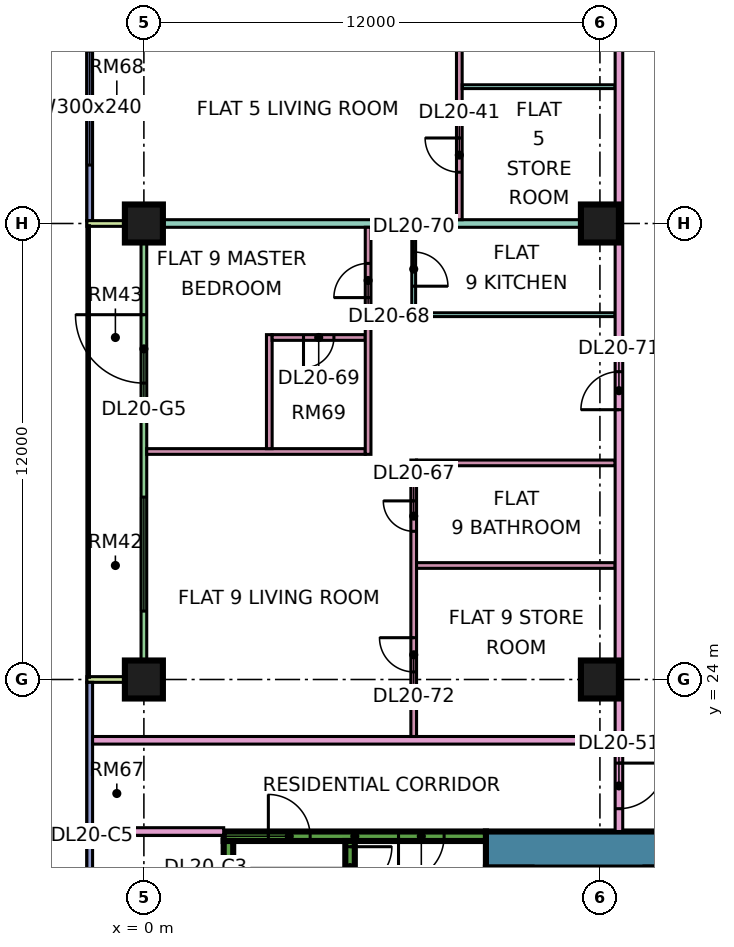
"""IFC4 building model, lengths in metres.
Left out: names, types, materials, properties, quantities, classifications, styles, units other than length and angle.
Written with IfcOpenShell. Run it as: python <this file> out.ifc"""

import sys

from ifc_helpers import new_model, si_unit, direction, frame, frame_2d, origin, origin_2d, place, context, subcontext, project, spatial, rectangle, extrude, element, fill, save


model = new_model("IFC4")
c1 = context("Model", 3, precision=1e-05, world=origin(), true_north=direction((0.0, 1.0)))
c2 = subcontext(c1, "Body", "Model", "MODEL_VIEW")
j1 = project(units=[si_unit("LENGTHUNIT", "METRE"), si_unit("PLANEANGLEUNIT", "RADIAN")], contexts=[c1])
p1 = place(None, origin())
s1 = spatial("IfcSite", under=j1, at=p1, CompositionType="ELEMENT")
p2 = place(p1, origin())
s2 = spatial("IfcBuilding", under=s1, at=p2, CompositionType="ELEMENT")
p3 = place(p2, frame((0.0, 0.0, 91.9)))
s3 = spatial("IfcBuildingStorey", under=s2, at=p3, CompositionType="ELEMENT", Elevation=91.9)
p4 = place(p3, frame((0.0, 24.0, 0.0), z_axis=(0.0, 0.0, 1.0), x_axis=(1.0, 0.0, 0.0)))
e1 = element("IfcColumn", 1, at=p4, inside=s3, PredefinedType="COLUMN", context=c2, shape_type="SweptSolid", body=[
    extrude(rectangle(XDim=1.0, YDim=1.0, at=origin_2d()), origin(), (0.0, 0.0, 1.0), 3.75),
])
p5 = place(p3, frame((0.0, 36.0, 0.0), z_axis=(0.0, 0.0, 1.0), x_axis=(1.0, 0.0, 0.0)))
e2 = element("IfcColumn", 2, at=p5, inside=s3, PredefinedType="COLUMN", context=c2, shape_type="SweptSolid", body=[
    extrude(rectangle(XDim=1.0, YDim=1.0, at=origin_2d()), origin(), (0.0, 0.0, 1.0), 3.75),
])
for number, where, z_axis, x_axis in (
    (3, (12.0, 24.0, 0.0), (0.0, 0.0, 1.0), (1.0, 0.0, 0.0)),
    (4, (12.0, 36.0, 0.0), (0.0, 0.0, 1.0), (1.0, 0.0, 0.0)),
):
    element("IfcColumn", number, at=place(p3, frame(where, z_axis=z_axis, x_axis=x_axis)), inside=s3, PredefinedType="COLUMN", context=c2, shape_type="SweptSolid", body=[
        extrude(rectangle(XDim=1.0, YDim=1.0, at=origin_2d()), origin(), (0.0, 0.0, 1.0), 3.75),
    ])
p6 = place(p3, frame((9.0, 19.525, 0.0), z_axis=(0.0, 0.0, 1.0), x_axis=(1.0, 0.0, 0.0)))
e5 = element("IfcWall", 5, at=p6, inside=s3, PredefinedType="SHEAR", context=c2, shape_type="SweptSolid", body=[
    extrude(rectangle(XDim=25.0, YDim=0.95, at=frame_2d((12.5, 0.0))), origin(), (0.0, 0.0, 1.0), 3.75),
])
p7 = place(p6, frame((19.1, 0.0, 0.0)))
e6 = element("IfcOpeningElement", 6, at=p7, cuts=e5, PredefinedType="OPENING", context=c2, shape_type="SweptSolid", body=[
    extrude(rectangle(XDim=1.8, YDim=2.4, at=frame_2d((0.9, 1.2))), frame((0.0, 0.485, 0.0), z_axis=(0.0, -1.0, 0.0), x_axis=(1.0, 0.0, 0.0)), (0.0, 0.0, 1.0), 0.97),
])
p8 = place(p3, frame((2.1, 19.875, 0.0), z_axis=(0.0, 0.0, 1.0), x_axis=(1.0, 0.0, 0.0)))
e7 = element("IfcWall", 7, at=p8, inside=s3, PredefinedType="SHEAR", context=c2, shape_type="SweptSolid", body=[
    extrude(rectangle(XDim=6.9, YDim=0.25, at=frame_2d((3.45, 0.0))), origin(), (0.0, 0.0, 1.0), 3.75),
])
p9 = place(p8, frame((1.175, 0.0, 0.0)))
e8 = element("IfcOpeningElement", 8, at=p9, cuts=e7, PredefinedType="OPENING", context=c2, shape_type="SweptSolid", body=[
    extrude(rectangle(XDim=1.1, YDim=2.2, at=frame_2d((0.55, 1.1))), frame((0.0, 0.135, 0.0), z_axis=(0.0, -1.0, 0.0), x_axis=(1.0, 0.0, 0.0)), (0.0, 0.0, 1.0), 0.27),
])
p10 = place(p8, frame((4.6, 0.0, 0.0)))
e9 = element("IfcOpeningElement", 9, at=p10, cuts=e7, PredefinedType="OPENING", context=c2, shape_type="SweptSolid", body=[
    extrude(rectangle(XDim=1.2, YDim=2.2, at=frame_2d((0.6, 1.1))), frame((0.0, 0.135, 0.0), z_axis=(0.0, -1.0, 0.0), x_axis=(1.0, 0.0, 0.0)), (0.0, 0.0, 1.0), 0.27),
])
p11 = place(p3, frame((2.225, 13.25, 0.0), z_axis=(0.0, 0.0, 1.0), x_axis=(0.0, 1.0, 0.0)))
e10 = element("IfcWall", 10, at=p11, inside=s3, PredefinedType="SHEAR", context=c2, shape_type="SweptSolid", body=[
    extrude(rectangle(XDim=6.5, YDim=0.25, at=frame_2d((3.25, 0.0))), origin(), (0.0, 0.0, 1.0), 3.75),
])
p12 = place(p3, frame((5.425, 13.25, 0.0), z_axis=(0.0, 0.0, 1.0), x_axis=(0.0, 1.0, 0.0)))
e11 = element("IfcWall", 11, at=p12, inside=s3, PredefinedType="SHEAR", context=c2, shape_type="SweptSolid", body=[
    extrude(rectangle(XDim=6.5, YDim=0.25, at=frame_2d((3.25, 0.0))), origin(), (0.0, 0.0, 1.0), 3.75),
])
p13 = place(p12, frame((5.25, 0.0, 0.0)))
e12 = element("IfcOpeningElement", 12, at=p13, cuts=e11, PredefinedType="OPENING", context=c2, shape_type="SweptSolid", body=[
    extrude(rectangle(XDim=1.1, YDim=2.2, at=frame_2d((0.55, 1.1))), frame((0.0, 0.135, 0.0), z_axis=(0.0, -1.0, 0.0), x_axis=(1.0, 0.0, 0.0)), (0.0, 0.0, 1.0), 0.27),
])
p14 = place(p3, frame((-1.425, 47.925, 0.0), z_axis=(0.0, 0.0, 1.0), x_axis=(0.0, -1.0, 0.0)))
e13 = element("IfcWall", 13, at=p14, inside=s3, PredefinedType="SOLIDWALL", context=c2, shape_type="SweptSolid", body=[
    extrude(rectangle(XDim=11.85, YDim=0.15, at=frame_2d((5.925, 0.0))), origin(), (0.0, 0.0, 1.0), 3.35),
])
p15 = place(p14, frame((1.462, 0.0, 0.45)))
e14 = element("IfcOpeningElement", 14, at=p15, cuts=e13, PredefinedType="OPENING", context=c2, shape_type="SweptSolid", body=[
    extrude(rectangle(XDim=3.0, YDim=2.4, at=frame_2d((1.5, 1.2))), frame((0.0, 0.085, 0.0), z_axis=(0.0, -1.0, 0.0), x_axis=(1.0, 0.0, 0.0)), (0.0, 0.0, 1.0), 0.17),
])
p16 = place(p14, frame((7.387, 0.0, 0.45)))
e15 = element("IfcOpeningElement", 15, at=p16, cuts=e13, PredefinedType="OPENING", context=c2, shape_type="SweptSolid", body=[
    extrude(rectangle(XDim=3.0, YDim=2.4, at=frame_2d((1.5, 1.2))), frame((0.0, 0.085, 0.0), z_axis=(0.0, -1.0, 0.0), x_axis=(1.0, 0.0, 0.0)), (0.0, 0.0, 1.0), 0.17),
])
p17 = place(p3, frame((0.0, 35.925, 0.0), z_axis=(0.0, 0.0, 1.0), x_axis=(0.0, -1.0, 0.0)))
e16 = element("IfcWall", 16, at=p17, inside=s3, PredefinedType="SOLIDWALL", context=c2, shape_type="SweptSolid", body=[
    extrude(rectangle(XDim=11.85, YDim=0.15, at=frame_2d((5.925, 0.0))), origin(), (0.0, 0.0, 1.0), 3.35),
])
p18 = place(p17, frame((2.325, 0.0, 0.0)))
e17 = element("IfcOpeningElement", 17, at=p18, cuts=e16, PredefinedType="OPENING", context=c2, shape_type="SweptSolid", body=[
    extrude(rectangle(XDim=1.8, YDim=2.4, at=frame_2d((0.9, 1.2))), frame((0.0, 0.085, 0.0), z_axis=(0.0, -1.0, 0.0), x_axis=(1.0, 0.0, 0.0)), (0.0, 0.0, 1.0), 0.17),
])
p19 = place(p17, frame((7.125, 0.0, 0.45)))
e18 = element("IfcOpeningElement", 18, at=p19, cuts=e16, PredefinedType="OPENING", context=c2, shape_type="SweptSolid", body=[
    extrude(rectangle(XDim=3.0, YDim=2.4, at=frame_2d((1.5, 1.2))), frame((0.0, 0.085, 0.0), z_axis=(0.0, -1.0, 0.0), x_axis=(1.0, 0.0, 0.0)), (0.0, 0.0, 1.0), 0.17),
])
for number, where, z_axis, x_axis in (
    (19, (-1.5, 36.0, 0.0), (0.0, 0.0, 1.0), (1.0, 0.0, 0.0)),
    (20, (-1.5, 24.0, 0.0), (0.0, 0.0, 1.0), (1.0, 0.0, 0.0)),
):
    element("IfcWall", number, at=place(p3, frame(where, z_axis=z_axis, x_axis=x_axis)), inside=s3, PredefinedType="SOLIDWALL", context=c2, shape_type="SweptSolid", body=[
        extrude(rectangle(XDim=1.5, YDim=0.15, at=frame_2d((0.75, 0.0))), origin(), (0.0, 0.0, 1.0), 3.35),
    ])
p20 = place(p3, frame((-1.425, 23.925, 0.0), z_axis=(0.0, 0.0, 1.0), x_axis=(0.0, -1.0, 0.0)))
e21 = element("IfcWall", 21, at=p20, inside=s3, PredefinedType="SOLIDWALL", context=c2, shape_type="SweptSolid", body=[
    extrude(rectangle(XDim=11.425, YDim=0.15, at=frame_2d((5.712, 0.0))), origin(), (0.0, 0.0, 1.0), 3.35),
])
p21 = place(p20, frame((6.175, 0.0, 0.45)))
e22 = element("IfcOpeningElement", 22, at=p21, cuts=e21, PredefinedType="OPENING", context=c2, shape_type="SweptSolid", body=[
    extrude(rectangle(XDim=3.0, YDim=2.4, at=frame_2d((1.5, 1.2))), frame((0.0, 0.085, 0.0), z_axis=(0.0, -1.0, 0.0), x_axis=(1.0, 0.0, 0.0)), (0.0, 0.0, 1.0), 0.17),
])
p22 = place(p3, frame((-1.35, 20.0, 0.0), z_axis=(0.0, 0.0, 1.0), x_axis=(1.0, 0.0, 0.0)))
e23 = element("IfcWall", 23, at=p22, inside=s3, PredefinedType="PARTITIONING", context=c2, shape_type="SweptSolid", body=[
    extrude(rectangle(XDim=3.45, YDim=0.2, at=frame_2d((1.725, 0.0))), origin(), (0.0, 0.0, 1.0), 3.35),
])
p23 = place(p3, frame((-1.35, 22.4, 0.0), z_axis=(0.0, 0.0, 1.0), x_axis=(1.0, 0.0, 0.0)))
e24 = element("IfcWall", 24, at=p23, inside=s3, PredefinedType="PARTITIONING", context=c2, shape_type="SweptSolid", body=[
    extrude(rectangle(XDim=13.75, YDim=0.2, at=frame_2d((6.875, 0.0))), origin(), (0.0, 0.0, 1.0), 3.35),
])
e25 = element("IfcWall", 25, at=p5, inside=s3, PredefinedType="PARTITIONING", context=c2, shape_type="SweptSolid", body=[
    extrude(rectangle(XDim=12.4, YDim=0.2, at=frame_2d((6.2, 0.0))), origin(), (0.0, 0.0, 1.0), 3.35),
])
p24 = place(p3, frame((0.074, 30.0, 0.0), z_axis=(0.0, 0.0, 1.0), x_axis=(1.0, 0.0, 0.0)))
e26 = element("IfcWall", 26, at=p24, inside=s3, PredefinedType="PARTITIONING", context=c2, shape_type="SweptSolid", body=[
    extrude(rectangle(XDim=5.751, YDim=0.15, at=frame_2d((2.875, 0.0))), origin(), (0.0, 0.0, 1.0), 3.35),
])
p25 = place(p3, frame((3.3, 30.075, 0.0), z_axis=(0.0, 0.0, 1.0), x_axis=(0.0, 1.0, 0.0)))
e27 = element("IfcWall", 27, at=p25, inside=s3, PredefinedType="PARTITIONING", context=c2, shape_type="SweptSolid", body=[
    extrude(rectangle(XDim=3.0, YDim=0.15, at=frame_2d((1.5, 0.0))), origin(), (0.0, 0.0, 1.0), 3.35),
])
p26 = place(p3, frame((3.375, 33.0, 0.0), z_axis=(0.0, 0.0, 1.0), x_axis=(1.0, 0.0, 0.0)))
e28 = element("IfcWall", 28, at=p26, inside=s3, PredefinedType="PARTITIONING", context=c2, shape_type="SweptSolid", body=[
    extrude(rectangle(XDim=2.45, YDim=0.15, at=frame_2d((1.225, 0.0))), origin(), (0.0, 0.0, 1.0), 3.35),
])
p27 = place(p26, frame((0.825, 0.0, 0.0)))
e29 = element("IfcOpeningElement", 29, at=p27, cuts=e28, PredefinedType="OPENING", context=c2, shape_type="SweptSolid", body=[
    extrude(rectangle(XDim=0.8, YDim=2.1, at=frame_2d((0.4, 1.05))), frame((0.0, 0.085, 0.0), z_axis=(0.0, -1.0, 0.0), x_axis=(1.0, 0.0, 0.0)), (0.0, 0.0, 1.0), 0.17),
])
p28 = place(p3, frame((5.9, 29.925, 0.0), z_axis=(0.0, 0.0, 1.0), x_axis=(0.0, 1.0, 0.0)))
e30 = element("IfcWall", 30, at=p28, inside=s3, PredefinedType="PARTITIONING", context=c2, shape_type="SweptSolid", body=[
    extrude(rectangle(XDim=5.975, YDim=0.15, at=frame_2d((2.987, 0.0))), origin(), (0.0, 0.0, 1.0), 3.35),
])
p29 = place(p28, frame((4.125, 0.0, 0.0)))
e31 = element("IfcOpeningElement", 31, at=p29, cuts=e30, PredefinedType="OPENING", context=c2, shape_type="SweptSolid", body=[
    extrude(rectangle(XDim=0.9, YDim=2.1, at=frame_2d((0.45, 1.05))), frame((0.0, 0.085, 0.0), z_axis=(0.0, -1.0, 0.0), x_axis=(1.0, 0.0, 0.0)), (0.0, 0.0, 1.0), 0.17),
])
p30 = place(p3, frame((7.05, 33.6, 0.0), z_axis=(0.0, 0.0, 1.0), x_axis=(1.0, 0.0, 0.0)))
e32 = element("IfcWall", 32, at=p30, inside=s3, PredefinedType="PARTITIONING", context=c2, shape_type="SweptSolid", body=[
    extrude(rectangle(XDim=5.35, YDim=0.1, at=frame_2d((2.675, 0.0))), origin(), (0.0, 0.0, 1.0), 3.35),
])
p31 = place(p3, frame((7.1, 22.5, 0.0), z_axis=(0.0, 0.0, 1.0), x_axis=(0.0, 1.0, 0.0)))
e33 = element("IfcWall", 33, at=p31, inside=s3, PredefinedType="PARTITIONING", context=c2, shape_type="SweptSolid", body=[
    extrude(rectangle(XDim=7.275, YDim=0.15, at=frame_2d((3.637, 0.0))), origin(), (0.0, 0.0, 1.0), 3.35),
])
p32 = place(p31, frame((5.4, 0.0, 0.0)))
e34 = element("IfcOpeningElement", 34, at=p32, cuts=e33, PredefinedType="OPENING", context=c2, shape_type="SweptSolid", body=[
    extrude(rectangle(XDim=0.8, YDim=2.1, at=frame_2d((0.4, 1.05))), frame((0.0, 0.085, 0.0), z_axis=(0.0, -1.0, 0.0), x_axis=(1.0, 0.0, 0.0)), (0.0, 0.0, 1.0), 0.17),
])
p33 = place(p31, frame((1.7, 0.0, 0.0)))
e35 = element("IfcOpeningElement", 35, at=p33, cuts=e33, PredefinedType="OPENING", context=c2, shape_type="SweptSolid", body=[
    extrude(rectangle(XDim=0.9, YDim=2.1, at=frame_2d((0.45, 1.05))), frame((0.0, 0.085, 0.0), z_axis=(0.0, -1.0, 0.0), x_axis=(1.0, 0.0, 0.0)), (0.0, 0.0, 1.0), 0.17),
])
p34 = place(p3, frame((7.1, 33.65, 0.0), z_axis=(0.0, 0.0, 1.0), x_axis=(0.0, 1.0, 0.0)))
e36 = element("IfcWall", 36, at=p34, inside=s3, PredefinedType="PARTITIONING", context=c2, shape_type="SweptSolid", body=[
    extrude(rectangle(XDim=2.25, YDim=0.1, at=frame_2d((1.125, 0.0))), origin(), (0.0, 0.0, 1.0), 3.35),
])
p35 = place(p34, frame((0.7, 0.0, 0.0)))
e37 = element("IfcOpeningElement", 37, at=p35, cuts=e36, PredefinedType="OPENING", context=c2, shape_type="SweptSolid", body=[
    extrude(rectangle(XDim=0.9, YDim=2.1, at=frame_2d((0.45, 1.05))), frame((0.0, 0.06, 0.0), z_axis=(0.0, -1.0, 0.0), x_axis=(1.0, 0.0, 0.0)), (0.0, 0.0, 1.0), 0.12),
])
for number, where, z_axis, x_axis in (
    (38, (7.175, 27.0, 0.0), (0.0, 0.0, 1.0), (1.0, 0.0, 0.0)),
    (39, (7.175, 29.7, 0.0), (0.0, 0.0, 1.0), (1.0, 0.0, 0.0)),
):
    element("IfcWall", number, at=place(p3, frame(where, z_axis=z_axis, x_axis=x_axis)), inside=s3, PredefinedType="PARTITIONING", context=c2, shape_type="SweptSolid", body=[
        extrude(rectangle(XDim=5.225, YDim=0.15, at=frame_2d((2.612, 0.0))), origin(), (0.0, 0.0, 1.0), 3.35),
    ])
p36 = place(p3, frame((8.3, 36.1, 0.0), z_axis=(0.0, 0.0, 1.0), x_axis=(0.0, 1.0, 0.0)))
e40 = element("IfcWall", 40, at=p36, inside=s3, PredefinedType="PARTITIONING", context=c2, shape_type="SweptSolid", body=[
    extrude(rectangle(XDim=11.375, YDim=0.15, at=frame_2d((5.688, 0.0))), origin(), (0.0, 0.0, 1.0), 3.35),
])
p37 = place(p36, frame((9.5, 0.0, 0.0)))
e41 = element("IfcOpeningElement", 41, at=p37, cuts=e40, PredefinedType="OPENING", context=c2, shape_type="SweptSolid", body=[
    extrude(rectangle(XDim=0.8, YDim=2.1, at=frame_2d((0.4, 1.05))), frame((0.0, 0.085, 0.0), z_axis=(0.0, -1.0, 0.0), x_axis=(1.0, 0.0, 0.0)), (0.0, 0.0, 1.0), 0.17),
])
p38 = place(p36, frame((5.6, 0.0, 0.0)))
e42 = element("IfcOpeningElement", 42, at=p38, cuts=e40, PredefinedType="OPENING", context=c2, shape_type="SweptSolid", body=[
    extrude(rectangle(XDim=0.9, YDim=2.1, at=frame_2d((0.45, 1.05))), frame((0.0, 0.085, 0.0), z_axis=(0.0, -1.0, 0.0), x_axis=(1.0, 0.0, 0.0)), (0.0, 0.0, 1.0), 0.17),
])
p39 = place(p36, frame((1.25, 0.0, 0.0)))
e43 = element("IfcOpeningElement", 43, at=p39, cuts=e40, PredefinedType="OPENING", context=c2, shape_type="SweptSolid", body=[
    extrude(rectangle(XDim=0.9, YDim=2.1, at=frame_2d((0.45, 1.05))), frame((0.0, 0.085, 0.0), z_axis=(0.0, -1.0, 0.0), x_axis=(1.0, 0.0, 0.0)), (0.0, 0.0, 1.0), 0.17),
])
p40 = place(p3, frame((8.375, 39.6, 0.0), z_axis=(0.0, 0.0, 1.0), x_axis=(1.0, 0.0, 0.0)))
e44 = element("IfcWall", 44, at=p40, inside=s3, PredefinedType="PARTITIONING", context=c2, shape_type="SweptSolid", body=[
    extrude(rectangle(XDim=4.025, YDim=0.1, at=frame_2d((2.012, 0.0))), origin(), (0.0, 0.0, 1.0), 3.35),
])
p41 = place(p3, frame((12.5, 20.0, 0.0), z_axis=(0.0, 0.0, 1.0), x_axis=(0.0, 1.0, 0.0)))
e45 = element("IfcWall", 45, at=p41, inside=s3, PredefinedType="PARTITIONING", context=c2, shape_type="SweptSolid", body=[
    extrude(rectangle(XDim=43.0, YDim=0.2, at=frame_2d((21.5, 0.0))), origin(), (0.0, 0.0, 1.0), 3.35),
])
p42 = place(p41, frame((28.65, 0.0, 0.0)))
e46 = element("IfcOpeningElement", 46, at=p42, cuts=e45, PredefinedType="OPENING", context=c2, shape_type="SweptSolid", body=[
    extrude(rectangle(XDim=1.0, YDim=2.1, at=frame_2d((0.5, 1.05))), frame((0.0, 0.11, 0.0), z_axis=(0.0, -1.0, 0.0), x_axis=(1.0, 0.0, 0.0)), (0.0, 0.0, 1.0), 0.22),
])
p43 = place(p41, frame((32.1, 0.0, 0.0)))
e47 = element("IfcOpeningElement", 47, at=p43, cuts=e45, PredefinedType="OPENING", context=c2, shape_type="SweptSolid", body=[
    extrude(rectangle(XDim=1.0, YDim=2.1, at=frame_2d((0.5, 1.05))), frame((0.0, 0.11, 0.0), z_axis=(0.0, -1.0, 0.0), x_axis=(1.0, 0.0, 0.0)), (0.0, 0.0, 1.0), 0.22),
])
p44 = place(p41, frame((0.6, 0.0, 0.0)))
e48 = element("IfcOpeningElement", 48, at=p44, cuts=e45, PredefinedType="OPENING", context=c2, shape_type="SweptSolid", body=[
    extrude(rectangle(XDim=1.2, YDim=2.1, at=frame_2d((0.6, 1.05))), frame((0.0, 0.11, 0.0), z_axis=(0.0, -1.0, 0.0), x_axis=(1.0, 0.0, 0.0)), (0.0, 0.0, 1.0), 0.22),
])
p45 = place(p41, frame((11.1, 0.0, 0.0)))
e49 = element("IfcOpeningElement", 49, at=p45, cuts=e45, PredefinedType="OPENING", context=c2, shape_type="SweptSolid", body=[
    extrude(rectangle(XDim=1.0, YDim=2.1, at=frame_2d((0.5, 1.05))), frame((0.0, 0.11, 0.0), z_axis=(0.0, -1.0, 0.0), x_axis=(1.0, 0.0, 0.0)), (0.0, 0.0, 1.0), 0.22),
])
p46 = place(p16, origin())
e50 = element("IfcWindow", 50, at=p46, inside=s3, PartitioningType="SINGLE_PANEL", PredefinedType="WINDOW", context=c2, shape_type="SweptSolid", body=[
    extrude(rectangle(XDim=3.0, YDim=2.4, at=frame_2d((1.5, 1.2))), frame((0.0, 0.03, 0.0), z_axis=(0.0, -1.0, 0.0), x_axis=(1.0, 0.0, 0.0)), (0.0, 0.0, 1.0), 0.06),
])
fill(e15, e50)
p47 = place(p18, frame((1.8, 0.0, 0.0), z_axis=(0.0, 0.0, 1.0), x_axis=(-1.0, 0.0, 0.0)))
e51 = element("IfcDoor", 51, at=p47, inside=s3, OperationType="DOUBLE_DOOR_SINGLE_SWING", PredefinedType="DOOR", context=c2, shape_type="SweptSolid", body=[
    extrude(rectangle(XDim=1.8, YDim=2.4, at=frame_2d((0.9, 1.2))), frame((0.0, 0.025, 0.0), z_axis=(0.0, -1.0, 0.0), x_axis=(1.0, 0.0, 0.0)), (0.0, 0.0, 1.0), 0.05),
])
fill(e17, e51)
p48 = place(p19, origin())
e52 = element("IfcWindow", 52, at=p48, inside=s3, PartitioningType="SINGLE_PANEL", PredefinedType="WINDOW", context=c2, shape_type="SweptSolid", body=[
    extrude(rectangle(XDim=3.0, YDim=2.4, at=frame_2d((1.5, 1.2))), frame((0.0, 0.03, 0.0), z_axis=(0.0, -1.0, 0.0), x_axis=(1.0, 0.0, 0.0)), (0.0, 0.0, 1.0), 0.06),
])
fill(e18, e52)
p49 = place(p13, origin())
e53 = element("IfcDoor", 53, at=p49, inside=s3, OperationType="SINGLE_SWING_RIGHT", PredefinedType="DOOR", context=c2, shape_type="SweptSolid", body=[
    extrude(rectangle(XDim=1.1, YDim=2.2, at=frame_2d((0.55, 1.1))), frame((0.0, 0.025, 0.0), z_axis=(0.0, -1.0, 0.0), x_axis=(1.0, 0.0, 0.0)), (0.0, 0.0, 1.0), 0.05),
])
fill(e12, e53)
p50 = place(p9, origin())
e54 = element("IfcDoor", 54, at=p50, inside=s3, OperationType="SINGLE_SWING_LEFT", PredefinedType="DOOR", context=c2, shape_type="SweptSolid", body=[
    extrude(rectangle(XDim=1.1, YDim=2.2, at=frame_2d((0.55, 1.1))), frame((0.0, 0.025, 0.0), z_axis=(0.0, -1.0, 0.0), x_axis=(1.0, 0.0, 0.0)), (0.0, 0.0, 1.0), 0.05),
])
fill(e8, e54)
p51 = place(p10, frame((1.2, 0.0, 0.0), z_axis=(0.0, 0.0, 1.0), x_axis=(-1.0, 0.0, 0.0)))
e55 = element("IfcDoor", 55, at=p51, inside=s3, OperationType="SINGLE_SWING_LEFT", PredefinedType="DOOR", context=c2, shape_type="SweptSolid", body=[
    extrude(rectangle(XDim=1.2, YDim=2.2, at=frame_2d((0.6, 1.1))), frame((0.0, 0.025, 0.0), z_axis=(0.0, -1.0, 0.0), x_axis=(1.0, 0.0, 0.0)), (0.0, 0.0, 1.0), 0.05),
])
fill(e9, e55)
p52 = place(p39, frame((0.9, 0.0, 0.0), z_axis=(0.0, 0.0, 1.0), x_axis=(-1.0, 0.0, 0.0)))
e56 = element("IfcDoor", 56, at=p52, inside=s3, OperationType="SINGLE_SWING_RIGHT", PredefinedType="DOOR", context=c2, shape_type="SweptSolid", body=[
    extrude(rectangle(XDim=0.9, YDim=2.1, at=frame_2d((0.45, 1.05))), frame((0.0, 0.025, 0.0), z_axis=(0.0, -1.0, 0.0), x_axis=(1.0, 0.0, 0.0)), (0.0, 0.0, 1.0), 0.05),
])
fill(e43, e56)
p53 = place(p44, origin())
e57 = element("IfcDoor", 57, at=p53, inside=s3, OperationType="SINGLE_SWING_RIGHT", PredefinedType="DOOR", context=c2, shape_type="SweptSolid", body=[
    extrude(rectangle(XDim=1.2, YDim=2.1, at=frame_2d((0.6, 1.05))), frame((0.0, 0.025, 0.0), z_axis=(0.0, -1.0, 0.0), x_axis=(1.0, 0.0, 0.0)), (0.0, 0.0, 1.0), 0.05),
])
fill(e48, e57)
p54 = place(p32, frame((0.8, 0.0, 0.0), z_axis=(0.0, 0.0, 1.0), x_axis=(-1.0, 0.0, 0.0)))
e58 = element("IfcDoor", 58, at=p54, inside=s3, OperationType="SINGLE_SWING_RIGHT", PredefinedType="DOOR", context=c2, shape_type="SweptSolid", body=[
    extrude(rectangle(XDim=0.8, YDim=2.1, at=frame_2d((0.4, 1.05))), frame((0.0, 0.025, 0.0), z_axis=(0.0, -1.0, 0.0), x_axis=(1.0, 0.0, 0.0)), (0.0, 0.0, 1.0), 0.05),
])
fill(e34, e58)
p55 = place(p29, origin())
e59 = element("IfcDoor", 59, at=p55, inside=s3, OperationType="SINGLE_SWING_LEFT", PredefinedType="DOOR", context=c2, shape_type="SweptSolid", body=[
    extrude(rectangle(XDim=0.9, YDim=2.1, at=frame_2d((0.45, 1.05))), frame((0.0, 0.025, 0.0), z_axis=(0.0, -1.0, 0.0), x_axis=(1.0, 0.0, 0.0)), (0.0, 0.0, 1.0), 0.05),
])
fill(e31, e59)
p56 = place(p27, frame((0.8, 0.0, 0.0), z_axis=(0.0, 0.0, 1.0), x_axis=(-1.0, 0.0, 0.0)))
e60 = element("IfcDoor", 60, at=p56, inside=s3, OperationType="SINGLE_SWING_LEFT", PredefinedType="DOOR", context=c2, shape_type="SweptSolid", body=[
    extrude(rectangle(XDim=0.8, YDim=2.1, at=frame_2d((0.4, 1.05))), frame((0.0, 0.025, 0.0), z_axis=(0.0, -1.0, 0.0), x_axis=(1.0, 0.0, 0.0)), (0.0, 0.0, 1.0), 0.05),
])
fill(e29, e60)
p57 = place(p35, frame((0.9, 0.0, 0.0), z_axis=(0.0, 0.0, 1.0), x_axis=(-1.0, 0.0, 0.0)))
e61 = element("IfcDoor", 61, at=p57, inside=s3, OperationType="SINGLE_SWING_LEFT", PredefinedType="DOOR", context=c2, shape_type="SweptSolid", body=[
    extrude(rectangle(XDim=0.9, YDim=2.1, at=frame_2d((0.45, 1.05))), frame((0.0, 0.025, 0.0), z_axis=(0.0, -1.0, 0.0), x_axis=(1.0, 0.0, 0.0)), (0.0, 0.0, 1.0), 0.05),
])
fill(e37, e61)
p58 = place(p45, origin())
e62 = element("IfcDoor", 62, at=p58, inside=s3, OperationType="SINGLE_SWING_LEFT", PredefinedType="DOOR", context=c2, shape_type="SweptSolid", body=[
    extrude(rectangle(XDim=1.0, YDim=2.1, at=frame_2d((0.5, 1.05))), frame((0.0, 0.025, 0.0), z_axis=(0.0, -1.0, 0.0), x_axis=(1.0, 0.0, 0.0)), (0.0, 0.0, 1.0), 0.05),
])
fill(e49, e62)
p59 = place(p33, frame((0.9, 0.0, 0.0), z_axis=(0.0, 0.0, 1.0), x_axis=(-1.0, 0.0, 0.0)))
e63 = element("IfcDoor", 63, at=p59, inside=s3, OperationType="SINGLE_SWING_RIGHT", PredefinedType="DOOR", context=c2, shape_type="SweptSolid", body=[
    extrude(rectangle(XDim=0.9, YDim=2.1, at=frame_2d((0.45, 1.05))), frame((0.0, 0.025, 0.0), z_axis=(0.0, -1.0, 0.0), x_axis=(1.0, 0.0, 0.0)), (0.0, 0.0, 1.0), 0.05),
])
fill(e35, e63)
save(model, sys.argv[1])
